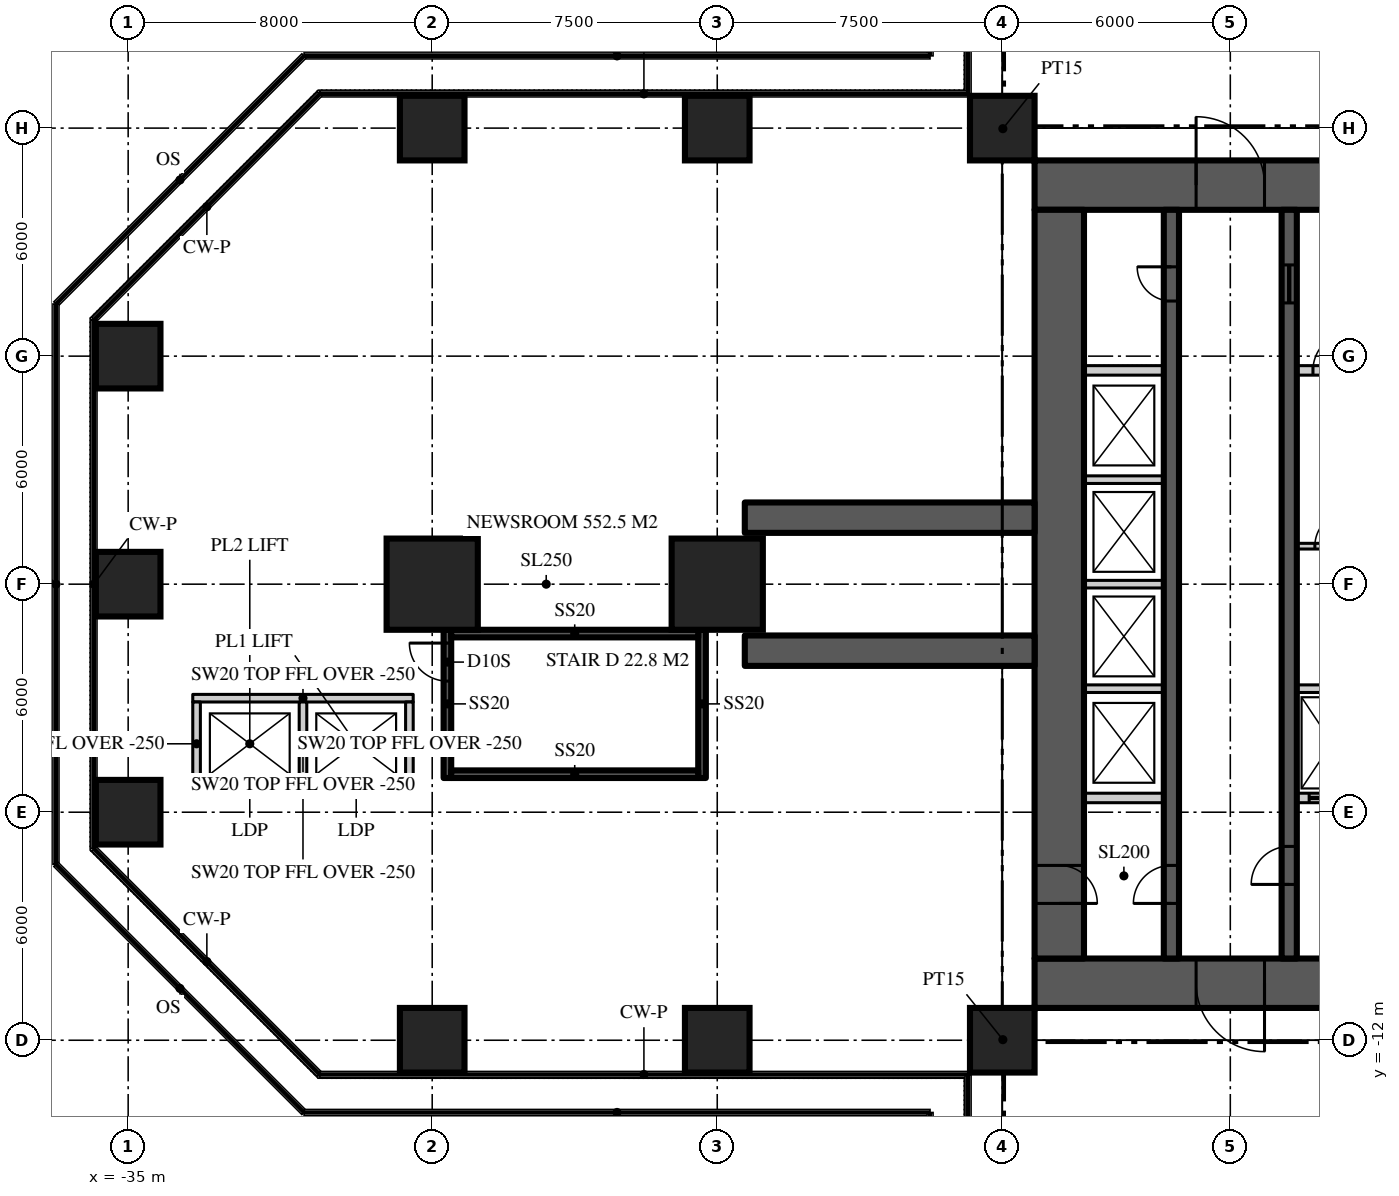
"""IFC4 building model, lengths in metres.
Left out: names, types, materials, properties, quantities, classifications, styles, units other than length and angle.
Written with IfcOpenShell. Run it as: python <this file> out.ifc"""

import sys

from ifc_helpers import new_model, si_unit, direction, frame, frame_2d, origin, origin_2d, place, context, subcontext, project, spatial, rectangle, extrude, element, fill, save


model = new_model("IFC4")
c1 = context("Model", 3, precision=1e-05, world=origin(), true_north=direction((0.0, 1.0)))
c2 = subcontext(c1, "Body", "Model", "MODEL_VIEW")
j1 = project(units=[si_unit("LENGTHUNIT", "METRE"), si_unit("PLANEANGLEUNIT", "RADIAN")], contexts=[c1])
p1 = place(None, origin())
s1 = spatial("IfcSite", under=j1, at=p1, CompositionType="ELEMENT")
p2 = place(p1, origin())
s2 = spatial("IfcBuilding", under=s1, at=p2, CompositionType="ELEMENT")
p3 = place(p2, frame((0.0, 0.0, 33.0)))
s3 = spatial("IfcBuildingStorey", under=s2, at=p3, CompositionType="ELEMENT", Elevation=33.0)
p4 = place(p3, frame((-11.15, 10.5, 0.0), z_axis=(0.0, 0.0, 1.0), x_axis=(1.0, 0.0, 0.0)))
e1 = element("IfcWall", 1, at=p4, inside=s3, PredefinedType="SHEAR", context=c2, shape_type="SweptSolid", body=[
    extrude(rectangle(XDim=22.3, YDim=1.3, at=frame_2d((11.15, 0.0))), origin(), (0.0, 0.0, 1.0), 4.5),
])
p5 = place(p4, frame((4.25, 0.0, 0.0)))
e2 = element("IfcOpeningElement", 2, at=p5, cuts=e1, PredefinedType="OPENING", context=c2, shape_type="SweptSolid", body=[
    extrude(rectangle(XDim=1.8, YDim=2.2, at=frame_2d((0.9, 1.1))), frame((0.0, 0.66, 0.0), z_axis=(0.0, -1.0, 0.0), x_axis=(1.0, 0.0, 0.0)), (0.0, 0.0, 1.0), 1.32),
])
p6 = place(p4, frame((16.25, 0.0, 0.0)))
e3 = element("IfcOpeningElement", 3, at=p6, cuts=e1, PredefinedType="OPENING", context=c2, shape_type="SweptSolid", body=[
    extrude(rectangle(XDim=1.8, YDim=2.2, at=frame_2d((0.9, 1.1))), frame((0.0, 0.66, 0.0), z_axis=(0.0, -1.0, 0.0), x_axis=(1.0, 0.0, 0.0)), (0.0, 0.0, 1.0), 1.32),
])
p7 = place(p3, frame((11.15, -10.5, 0.0), z_axis=(0.0, 0.0, 1.0), x_axis=(-1.0, 0.0, 0.0)))
e4 = element("IfcWall", 4, at=p7, inside=s3, PredefinedType="SHEAR", context=c2, shape_type="SweptSolid", body=[
    extrude(rectangle(XDim=22.3, YDim=1.3, at=frame_2d((11.15, 0.0))), origin(), (0.0, 0.0, 1.0), 4.5),
])
p8 = place(p7, frame((16.25, 0.0, 0.0)))
e5 = element("IfcOpeningElement", 5, at=p8, cuts=e4, PredefinedType="OPENING", context=c2, shape_type="SweptSolid", body=[
    extrude(rectangle(XDim=1.8, YDim=2.2, at=frame_2d((0.9, 1.1))), frame((0.0, 0.66, 0.0), z_axis=(0.0, -1.0, 0.0), x_axis=(1.0, 0.0, 0.0)), (0.0, 0.0, 1.0), 1.32),
])
p9 = place(p7, frame((4.25, 0.0, 0.0)))
e6 = element("IfcOpeningElement", 6, at=p9, cuts=e4, PredefinedType="OPENING", context=c2, shape_type="SweptSolid", body=[
    extrude(rectangle(XDim=1.8, YDim=2.2, at=frame_2d((0.9, 1.1))), frame((0.0, 0.66, 0.0), z_axis=(0.0, -1.0, 0.0), x_axis=(1.0, 0.0, 0.0)), (0.0, 0.0, 1.0), 1.32),
])
p10 = place(p3, frame((-10.5, 9.85, 0.0), z_axis=(0.0, 0.0, 1.0), x_axis=(0.0, -1.0, 0.0)))
e7 = element("IfcWall", 7, at=p10, inside=s3, PredefinedType="SHEAR", context=c2, shape_type="SweptSolid", body=[
    extrude(rectangle(XDim=19.7, YDim=1.3, at=frame_2d((9.85, 0.0))), origin(), (0.0, 0.0, 1.0), 4.5),
])
p11 = place(p10, frame((17.25, 0.0, 0.0)))
e8 = element("IfcOpeningElement", 8, at=p11, cuts=e7, PredefinedType="OPENING", context=c2, shape_type="SweptSolid", body=[
    extrude(rectangle(XDim=1.0, YDim=2.2, at=frame_2d((0.5, 1.1))), frame((0.0, 0.66, 0.0), z_axis=(0.0, -1.0, 0.0), x_axis=(1.0, 0.0, 0.0)), (0.0, 0.0, 1.0), 1.32),
])
for number, where, z_axis, x_axis in (
    (9, (-11.15, 1.75, 0.0), (0.0, 0.0, 1.0), (-1.0, 0.0, 0.0)),
    (10, (-11.15, -1.75, 0.0), (0.0, 0.0, 1.0), (-1.0, 0.0, 0.0)),
):
    element("IfcWall", number, at=place(p3, frame(where, z_axis=z_axis, x_axis=x_axis)), inside=s3, PredefinedType="SHEAR", context=c2, shape_type="SweptSolid", body=[
        extrude(rectangle(XDim=7.625, YDim=0.8, at=frame_2d((3.812, 0.0))), origin(), (0.0, 0.0, 1.0), 4.5),
    ])
for number, where, z_axis, x_axis in (
    (11, (-27.0, -12.0, 0.0), (0.0, 0.0, 1.0), (1.0, 0.0, 0.0)),
    (12, (-19.5, -12.0, 0.0), (0.0, 0.0, 1.0), (1.0, 0.0, 0.0)),
    (13, (-12.0, -12.0, 0.0), (0.0, 0.0, 1.0), (1.0, 0.0, 0.0)),
    (14, (-35.0, -6.0, 0.0), (0.0, 0.0, 1.0), (1.0, 0.0, 0.0)),
    (15, (-35.0, 0.0, 0.0), (0.0, 0.0, 1.0), (1.0, 0.0, 0.0)),
):
    element("IfcColumn", number, at=place(p3, frame(where, z_axis=z_axis, x_axis=x_axis)), inside=s3, PredefinedType="COLUMN", context=c2, shape_type="SweptSolid", body=[
        extrude(rectangle(XDim=1.7, YDim=1.7, at=origin_2d()), origin(), (0.0, 0.0, 1.0), 4.5),
    ])
for number, where, z_axis, x_axis in (
    (16, (-27.0, 0.0, 0.0), (0.0, 0.0, 1.0), (1.0, 0.0, 0.0)),
    (17, (-19.5, 0.0, 0.0), (0.0, 0.0, 1.0), (1.0, 0.0, 0.0)),
):
    element("IfcColumn", number, at=place(p3, frame(where, z_axis=z_axis, x_axis=x_axis)), inside=s3, PredefinedType="COLUMN", context=c2, shape_type="SweptSolid", body=[
        extrude(rectangle(XDim=2.4, YDim=2.4, at=origin_2d()), origin(), (0.0, 0.0, 1.0), 4.5),
    ])
for number, where, z_axis, x_axis in (
    (18, (-35.0, 6.0, 0.0), (0.0, 0.0, 1.0), (1.0, 0.0, 0.0)),
    (19, (-27.0, 12.0, 0.0), (0.0, 0.0, 1.0), (1.0, 0.0, 0.0)),
    (20, (-19.5, 12.0, 0.0), (0.0, 0.0, 1.0), (1.0, 0.0, 0.0)),
    (21, (-12.0, 12.0, 0.0), (0.0, 0.0, 1.0), (1.0, 0.0, 0.0)),
):
    element("IfcColumn", number, at=place(p3, frame(where, z_axis=z_axis, x_axis=x_axis)), inside=s3, PredefinedType="COLUMN", context=c2, shape_type="SweptSolid", body=[
        extrude(rectangle(XDim=1.7, YDim=1.7, at=origin_2d()), origin(), (0.0, 0.0, 1.0), 4.5),
    ])
p12 = place(p3, frame((-7.55, -9.85, 0.0), z_axis=(0.0, 0.0, 1.0), x_axis=(0.0, 1.0, 0.0)))
e22 = element("IfcWall", 22, at=p12, inside=s3, PredefinedType="SHEAR", context=c2, shape_type="SweptSolid", body=[
    extrude(rectangle(XDim=19.7, YDim=0.4, at=frame_2d((9.85, 0.0))), origin(), (0.0, 0.0, 1.0), 4.5),
])
p13 = place(p12, frame((1.45, 0.0, 0.0)))
e23 = element("IfcOpeningElement", 23, at=p13, cuts=e22, PredefinedType="OPENING", context=c2, shape_type="SweptSolid", body=[
    extrude(rectangle(XDim=1.0, YDim=2.2, at=frame_2d((0.5, 1.1))), frame((0.0, 0.21, 0.0), z_axis=(0.0, -1.0, 0.0), x_axis=(1.0, 0.0, 0.0)), (0.0, 0.0, 1.0), 0.42),
])
p14 = place(p12, frame((17.3, 0.0, 0.0)))
e24 = element("IfcOpeningElement", 24, at=p14, cuts=e22, PredefinedType="OPENING", context=c2, shape_type="SweptSolid", body=[
    extrude(rectangle(XDim=0.9, YDim=2.1, at=frame_2d((0.45, 1.05))), frame((0.0, 0.21, 0.0), z_axis=(0.0, -1.0, 0.0), x_axis=(1.0, 0.0, 0.0)), (0.0, 0.0, 1.0), 0.42),
])
p15 = place(p3, frame((-4.45, -9.85, 0.0), z_axis=(0.0, 0.0, 1.0), x_axis=(0.0, 1.0, 0.0)))
e25 = element("IfcWall", 25, at=p15, inside=s3, PredefinedType="SHEAR", context=c2, shape_type="SweptSolid", body=[
    extrude(rectangle(XDim=19.7, YDim=0.4, at=frame_2d((9.85, 0.0))), origin(), (0.0, 0.0, 1.0), 4.5),
])
p16 = place(p15, frame((1.95, 0.0, 0.0)))
e26 = element("IfcOpeningElement", 26, at=p16, cuts=e25, PredefinedType="OPENING", context=c2, shape_type="SweptSolid", body=[
    extrude(rectangle(XDim=1.0, YDim=2.2, at=frame_2d((0.5, 1.1))), frame((0.0, 0.21, 0.0), z_axis=(0.0, -1.0, 0.0), x_axis=(1.0, 0.0, 0.0)), (0.0, 0.0, 1.0), 0.42),
])
p17 = place(p15, frame((17.25, 0.0, 0.0)))
e27 = element("IfcOpeningElement", 27, at=p17, cuts=e25, PredefinedType="OPENING", context=c2, shape_type="SweptSolid", body=[
    extrude(rectangle(XDim=1.0, YDim=2.1, at=frame_2d((0.5, 1.05))), frame((0.0, 0.21, 0.0), z_axis=(0.0, -1.0, 0.0), x_axis=(1.0, 0.0, 0.0)), (0.0, 0.0, 1.0), 0.42),
])
p18 = place(p3, frame((-9.85, 5.625, 0.0), z_axis=(0.0, 0.0, 1.0), x_axis=(1.0, 0.0, 0.0)))
e28 = element("IfcWall", 28, at=p18, inside=s3, PredefinedType="SOLIDWALL", context=c2, shape_type="SweptSolid", body=[
    extrude(rectangle(XDim=2.1, YDim=0.25, at=frame_2d((1.05, 0.0))), origin(), (0.0, 0.0, 1.0), 4.3),
])
p19 = place(p3, frame((-4.25, 5.625, 0.0), z_axis=(0.0, 0.0, 1.0), x_axis=(1.0, 0.0, 0.0)))
e29 = element("IfcWall", 29, at=p19, inside=s3, PredefinedType="SOLIDWALL", context=c2, shape_type="SweptSolid", body=[
    extrude(rectangle(XDim=1.85, YDim=0.25, at=frame_2d((0.925, 0.0))), origin(), (0.0, 0.0, 1.0), 4.3),
])
p20 = place(p19, frame((0.425, 0.0, 0.0)))
e30 = element("IfcOpeningElement", 30, at=p20, cuts=e29, PredefinedType="OPENING", context=c2, shape_type="SweptSolid", body=[
    extrude(rectangle(XDim=1.0, YDim=2.2, at=frame_2d((0.5, 1.1))), frame((0.0, 0.135, 0.0), z_axis=(0.0, -1.0, 0.0), x_axis=(1.0, 0.0, 0.0)), (0.0, 0.0, 1.0), 0.27),
])
p21 = place(p3, frame((-9.85, -5.625, 0.0), z_axis=(0.0, 0.0, 1.0), x_axis=(1.0, 0.0, 0.0)))
e31 = element("IfcWall", 31, at=p21, inside=s3, PredefinedType="SOLIDWALL", context=c2, shape_type="SweptSolid", body=[
    extrude(rectangle(XDim=2.1, YDim=0.25, at=frame_2d((1.05, 0.0))), origin(), (0.0, 0.0, 1.0), 4.3),
])
p22 = place(p3, frame((-4.25, -5.625, 0.0), z_axis=(0.0, 0.0, 1.0), x_axis=(1.0, 0.0, 0.0)))
e32 = element("IfcWall", 32, at=p22, inside=s3, PredefinedType="SOLIDWALL", context=c2, shape_type="SweptSolid", body=[
    extrude(rectangle(XDim=1.85, YDim=0.25, at=frame_2d((0.925, 0.0))), origin(), (0.0, 0.0, 1.0), 4.3),
])
p23 = place(p22, frame((0.325, 0.0, 0.0)))
e33 = element("IfcOpeningElement", 33, at=p23, cuts=e32, PredefinedType="OPENING", context=c2, shape_type="SweptSolid", body=[
    extrude(rectangle(XDim=1.2, YDim=2.2, at=frame_2d((0.6, 1.1))), frame((0.0, 0.135, 0.0), z_axis=(0.0, -1.0, 0.0), x_axis=(1.0, 0.0, 0.0)), (0.0, 0.0, 1.0), 0.27),
])
p24 = place(p3, frame((-9.85, -2.75, 0.0), z_axis=(0.0, 0.0, 1.0), x_axis=(1.0, 0.0, 0.0)))
e34 = element("IfcWall", 34, at=p24, inside=s3, PredefinedType="SOLIDWALL", context=c2, shape_type="SweptSolid", body=[
    extrude(rectangle(XDim=2.1, YDim=0.2, at=frame_2d((1.05, 0.0))), origin(), (0.0, 0.0, 1.0), 4.3),
])
p25 = place(p3, frame((-4.25, -2.75, 0.0), z_axis=(0.0, 0.0, 1.0), x_axis=(1.0, 0.0, 0.0)))
e35 = element("IfcWall", 35, at=p25, inside=s3, PredefinedType="SOLIDWALL", context=c2, shape_type="SweptSolid", body=[
    extrude(rectangle(XDim=1.85, YDim=0.2, at=frame_2d((0.925, 0.0))), origin(), (0.0, 0.0, 1.0), 4.3),
])
for number, where, z_axis, x_axis in (
    (36, (-9.85, 0.0, 0.0), (0.0, 0.0, 1.0), (1.0, 0.0, 0.0)),
    (37, (-9.85, 2.75, 0.0), (0.0, 0.0, 1.0), (1.0, 0.0, 0.0)),
):
    element("IfcWall", number, at=place(p3, frame(where, z_axis=z_axis, x_axis=x_axis)), inside=s3, PredefinedType="SOLIDWALL", context=c2, shape_type="SweptSolid", body=[
        extrude(rectangle(XDim=2.1, YDim=0.2, at=frame_2d((1.05, 0.0))), origin(), (0.0, 0.0, 1.0), 4.3),
    ])
for number, where, z_axis, x_axis in (
    (38, (-11.15, 11.15, 0.0), (0.0, 0.0, 1.0), (-0.707, 0.707, 0.0)),
    (39, (-11.15, -11.15, 0.0), (0.0, 0.0, 1.0), (-0.707, -0.707, 0.0)),
):
    element("IfcWall", number, at=place(p3, frame(where, z_axis=z_axis, x_axis=x_axis)), inside=s3, PredefinedType="PARTITIONING", context=c2, shape_type="SweptSolid", body=[
        extrude(rectangle(XDim=2.362, YDim=0.15, at=frame_2d((1.181, 0.0))), origin(), (0.0, 0.0, 1.0), 4.25),
    ])
p26 = place(p3, frame((-4.25, 1.0, 0.0), z_axis=(0.0, 0.0, 1.0), x_axis=(1.0, 0.0, 0.0)))
e40 = element("IfcWall", 40, at=p26, inside=s3, PredefinedType="SOLIDWALL", context=c2, shape_type="SweptSolid", body=[
    extrude(rectangle(XDim=1.85, YDim=0.15, at=frame_2d((0.925, 0.0))), origin(), (0.0, 0.0, 1.0), 4.25),
])
p27 = place(p26, frame((0.475, 0.0, 0.0)))
e41 = element("IfcOpeningElement", 41, at=p27, cuts=e40, PredefinedType="OPENING", context=c2, shape_type="SweptSolid", body=[
    extrude(rectangle(XDim=0.9, YDim=2.1, at=frame_2d((0.45, 1.05))), frame((0.0, 0.085, 0.0), z_axis=(0.0, -1.0, 0.0), x_axis=(1.0, 0.0, 0.0)), (0.0, 0.0, 1.0), 0.17),
])
p28 = place(p3, frame((-27.5, -3.0, 0.0), z_axis=(0.0, 0.0, 1.0), x_axis=(-1.0, 0.0, 0.0)))
e42 = element("IfcWall", 42, at=p28, inside=s3, PredefinedType="SOLIDWALL", context=c2, shape_type="SweptSolid", body=[
    extrude(rectangle(XDim=5.8, YDim=0.2, at=frame_2d((2.9, 0.0))), origin(), (0.0, 0.0, 1.0), 4.25),
])
p29 = place(p3, frame((-33.3, -5.4, 0.0), z_axis=(0.0, 0.0, 1.0), x_axis=(1.0, 0.0, 0.0)))
e43 = element("IfcWall", 43, at=p29, inside=s3, PredefinedType="SOLIDWALL", context=c2, shape_type="SweptSolid", body=[
    extrude(rectangle(XDim=5.8, YDim=0.2, at=frame_2d((2.9, 0.0))), origin(), (0.0, 0.0, 1.0), 4.25),
])
p30 = place(p29, frame((3.75, 0.0, 0.0)))
e44 = element("IfcOpeningElement", 44, at=p30, cuts=e43, PredefinedType="OPENING", context=c2, shape_type="SweptSolid", body=[
    extrude(rectangle(XDim=1.1, YDim=2.2, at=frame_2d((0.55, 1.1))), frame((0.0, 0.11, 0.0), z_axis=(0.0, -1.0, 0.0), x_axis=(1.0, 0.0, 0.0)), (0.0, 0.0, 1.0), 0.22),
])
p31 = place(p29, frame((0.95, 0.0, 0.0)))
e45 = element("IfcOpeningElement", 45, at=p31, cuts=e43, PredefinedType="OPENING", context=c2, shape_type="SweptSolid", body=[
    extrude(rectangle(XDim=1.1, YDim=2.2, at=frame_2d((0.55, 1.1))), frame((0.0, 0.11, 0.0), z_axis=(0.0, -1.0, 0.0), x_axis=(1.0, 0.0, 0.0)), (0.0, 0.0, 1.0), 0.22),
])
for number, where, z_axis, x_axis in (
    (46, (-27.6, -3.1, 0.0), (0.0, 0.0, 1.0), (0.0, -1.0, 0.0)),
    (47, (-30.4, -3.1, 0.0), (0.0, 0.0, 1.0), (0.0, -1.0, 0.0)),
    (48, (-33.2, -3.1, 0.0), (0.0, 0.0, 1.0), (0.0, -1.0, 0.0)),
):
    element("IfcWall", number, at=place(p3, frame(where, z_axis=z_axis, x_axis=x_axis)), inside=s3, PredefinedType="SOLIDWALL", context=c2, shape_type="SweptSolid", body=[
        extrude(rectangle(XDim=2.2, YDim=0.2, at=frame_2d((1.1, 0.0))), origin(), (0.0, 0.0, 1.0), 4.25),
    ])
p32 = place(p3, frame((-19.9, -1.2, 0.0), z_axis=(0.0, 0.0, 1.0), x_axis=(0.0, -1.0, 0.0)))
e49 = element("IfcWall", 49, at=p32, inside=s3, PredefinedType="SOLIDWALL", context=c2, shape_type="SweptSolid", body=[
    extrude(rectangle(XDim=3.9, YDim=0.2, at=frame_2d((1.95, 0.0))), origin(), (0.0, 0.0, 1.0), 4.25),
])
p33 = place(p3, frame((-26.6, -5.1, 0.0), z_axis=(0.0, 0.0, 1.0), x_axis=(0.0, 1.0, 0.0)))
e50 = element("IfcWall", 50, at=p33, inside=s3, PredefinedType="SOLIDWALL", context=c2, shape_type="SweptSolid", body=[
    extrude(rectangle(XDim=3.9, YDim=0.2, at=frame_2d((1.95, 0.0))), origin(), (0.0, 0.0, 1.0), 4.25),
])
p34 = place(p33, frame((2.55, 0.0, 0.0)))
e51 = element("IfcOpeningElement", 51, at=p34, cuts=e50, PredefinedType="OPENING", context=c2, shape_type="SweptSolid", body=[
    extrude(rectangle(XDim=1.0, YDim=2.2, at=frame_2d((0.5, 1.1))), frame((0.0, 0.11, 0.0), z_axis=(0.0, -1.0, 0.0), x_axis=(1.0, 0.0, 0.0)), (0.0, 0.0, 1.0), 0.22),
])
for number, where, z_axis, x_axis in (
    (52, (-20.0, -1.3, 0.0), (0.0, 0.0, 1.0), (-1.0, 0.0, 0.0)),
    (53, (-26.5, -5.0, 0.0), (0.0, 0.0, 1.0), (1.0, 0.0, 0.0)),
):
    element("IfcWall", number, at=place(p3, frame(where, z_axis=z_axis, x_axis=x_axis)), inside=s3, PredefinedType="SOLIDWALL", context=c2, shape_type="SweptSolid", body=[
        extrude(rectangle(XDim=6.5, YDim=0.2, at=frame_2d((3.25, 0.0))), origin(), (0.0, 0.0, 1.0), 4.25),
    ])
p35 = place(p30, origin())
e54 = element("IfcDoor", 54, at=p35, inside=s3, OperationType="SLIDING_TO_LEFT", PredefinedType="DOOR", context=c2, shape_type="SweptSolid", body=[
    extrude(rectangle(XDim=1.1, YDim=2.2, at=frame_2d((0.55, 1.1))), frame((0.0, 0.025, 0.0), z_axis=(0.0, -1.0, 0.0), x_axis=(1.0, 0.0, 0.0)), (0.0, 0.0, 1.0), 0.05),
])
fill(e44, e54)
p36 = place(p31, origin())
e55 = element("IfcDoor", 55, at=p36, inside=s3, OperationType="SLIDING_TO_LEFT", PredefinedType="DOOR", context=c2, shape_type="SweptSolid", body=[
    extrude(rectangle(XDim=1.1, YDim=2.2, at=frame_2d((0.55, 1.1))), frame((0.0, 0.025, 0.0), z_axis=(0.0, -1.0, 0.0), x_axis=(1.0, 0.0, 0.0)), (0.0, 0.0, 1.0), 0.05),
])
fill(e45, e55)
p37 = place(p5, origin())
e56 = element("IfcDoor", 56, at=p37, inside=s3, OperationType="DOUBLE_DOOR_DOUBLE_SWING", PredefinedType="DOOR", context=c2, shape_type="SweptSolid", body=[
    extrude(rectangle(XDim=1.8, YDim=2.2, at=frame_2d((0.9, 1.1))), frame((0.0, 0.025, 0.0), z_axis=(0.0, -1.0, 0.0), x_axis=(1.0, 0.0, 0.0)), (0.0, 0.0, 1.0), 0.05),
])
fill(e2, e56)
p38 = place(p8, origin())
e57 = element("IfcDoor", 57, at=p38, inside=s3, OperationType="DOUBLE_DOOR_DOUBLE_SWING", PredefinedType="DOOR", context=c2, shape_type="SweptSolid", body=[
    extrude(rectangle(XDim=1.8, YDim=2.2, at=frame_2d((0.9, 1.1))), frame((0.0, 0.025, 0.0), z_axis=(0.0, -1.0, 0.0), x_axis=(1.0, 0.0, 0.0)), (0.0, 0.0, 1.0), 0.05),
])
fill(e5, e57)
p39 = place(p13, origin())
e58 = element("IfcDoor", 58, at=p39, inside=s3, OperationType="SINGLE_SWING_LEFT", PredefinedType="DOOR", context=c2, shape_type="SweptSolid", body=[
    extrude(rectangle(XDim=1.0, YDim=2.2, at=frame_2d((0.5, 1.1))), frame((0.0, 0.025, 0.0), z_axis=(0.0, -1.0, 0.0), x_axis=(1.0, 0.0, 0.0)), (0.0, 0.0, 1.0), 0.05),
])
fill(e23, e58)
p40 = place(p11, origin())
e59 = element("IfcDoor", 59, at=p40, inside=s3, OperationType="SINGLE_SWING_RIGHT", PredefinedType="DOOR", context=c2, shape_type="SweptSolid", body=[
    extrude(rectangle(XDim=1.0, YDim=2.2, at=frame_2d((0.5, 1.1))), frame((0.0, 0.025, 0.0), z_axis=(0.0, -1.0, 0.0), x_axis=(1.0, 0.0, 0.0)), (0.0, 0.0, 1.0), 0.05),
])
fill(e8, e59)
p41 = place(p16, origin())
e60 = element("IfcDoor", 60, at=p41, inside=s3, OperationType="SINGLE_SWING_LEFT", PredefinedType="DOOR", context=c2, shape_type="SweptSolid", body=[
    extrude(rectangle(XDim=1.0, YDim=2.2, at=frame_2d((0.5, 1.1))), frame((0.0, 0.025, 0.0), z_axis=(0.0, -1.0, 0.0), x_axis=(1.0, 0.0, 0.0)), (0.0, 0.0, 1.0), 0.05),
])
fill(e26, e60)
p42 = place(p14, origin())
e61 = element("IfcDoor", 61, at=p42, inside=s3, OperationType="SINGLE_SWING_RIGHT", PredefinedType="DOOR", context=c2, shape_type="SweptSolid", body=[
    extrude(rectangle(XDim=0.9, YDim=2.1, at=frame_2d((0.45, 1.05))), frame((0.0, 0.025, 0.0), z_axis=(0.0, -1.0, 0.0), x_axis=(1.0, 0.0, 0.0)), (0.0, 0.0, 1.0), 0.05),
])
fill(e24, e61)
p43 = place(p17, origin())
e62 = element("IfcDoor", 62, at=p43, inside=s3, OperationType="SLIDING_TO_LEFT", PredefinedType="DOOR", context=c2, shape_type="SweptSolid", body=[
    extrude(rectangle(XDim=1.0, YDim=2.1, at=frame_2d((0.5, 1.05))), frame((0.0, 0.025, 0.0), z_axis=(0.0, -1.0, 0.0), x_axis=(1.0, 0.0, 0.0)), (0.0, 0.0, 1.0), 0.05),
])
fill(e27, e62)
p44 = place(p23, origin())
e63 = element("IfcDoor", 63, at=p44, inside=s3, OperationType="SLIDING_TO_LEFT", PredefinedType="DOOR", context=c2, shape_type="SweptSolid", body=[
    extrude(rectangle(XDim=1.2, YDim=2.2, at=frame_2d((0.6, 1.1))), frame((0.0, 0.025, 0.0), z_axis=(0.0, -1.0, 0.0), x_axis=(1.0, 0.0, 0.0)), (0.0, 0.0, 1.0), 0.05),
])
fill(e33, e63)
p45 = place(p27, origin())
e64 = element("IfcDoor", 64, at=p45, inside=s3, OperationType="SINGLE_SWING_RIGHT", PredefinedType="DOOR", context=c2, shape_type="SweptSolid", body=[
    extrude(rectangle(XDim=0.9, YDim=2.1, at=frame_2d((0.45, 1.05))), frame((0.0, 0.025, 0.0), z_axis=(0.0, -1.0, 0.0), x_axis=(1.0, 0.0, 0.0)), (0.0, 0.0, 1.0), 0.05),
])
fill(e41, e64)
p46 = place(p20, origin())
e65 = element("IfcDoor", 65, at=p46, inside=s3, OperationType="SINGLE_SWING_RIGHT", PredefinedType="DOOR", context=c2, shape_type="SweptSolid", body=[
    extrude(rectangle(XDim=1.0, YDim=2.2, at=frame_2d((0.5, 1.1))), frame((0.0, 0.025, 0.0), z_axis=(0.0, -1.0, 0.0), x_axis=(1.0, 0.0, 0.0)), (0.0, 0.0, 1.0), 0.05),
])
fill(e30, e65)
p47 = place(p34, origin())
e66 = element("IfcDoor", 66, at=p47, inside=s3, OperationType="SINGLE_SWING_RIGHT", PredefinedType="DOOR", context=c2, shape_type="SweptSolid", body=[
    extrude(rectangle(XDim=1.0, YDim=2.2, at=frame_2d((0.5, 1.1))), frame((0.0, 0.025, 0.0), z_axis=(0.0, -1.0, 0.0), x_axis=(1.0, 0.0, 0.0)), (0.0, 0.0, 1.0), 0.05),
])
fill(e51, e66)
save(model, sys.argv[1])
